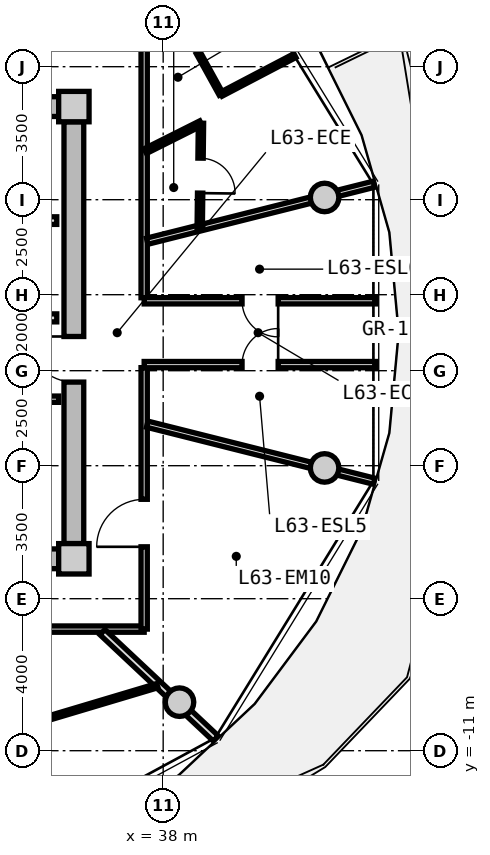
"""IFC4 building model, lengths in metres.
Left out: names, types, materials, properties, quantities, classifications, styles, units other than length and angle.
Written with IfcOpenShell. Run it as: python <this file> out.ifc"""

import sys

from ifc_helpers import new_model, si_unit, direction, frame, frame_2d, origin, origin_2d, place, context, subcontext, project, spatial, rectangle, circle, extrude, source, transform, mapped, element, fill, save


model = new_model("IFC4")
c1 = context("Model", 3, precision=1e-05, world=origin(), true_north=direction((0.0, 1.0)))
c2 = subcontext(c1, "Body", "Model", "MODEL_VIEW")
j1 = project(units=[si_unit("LENGTHUNIT", "METRE"), si_unit("PLANEANGLEUNIT", "RADIAN")], contexts=[c1])
p1 = place(None, origin())
s1 = spatial("IfcSite", under=j1, at=p1, CompositionType="ELEMENT")
p2 = place(p1, origin())
s2 = spatial("IfcBuilding", under=s1, at=p2, CompositionType="ELEMENT")
p3 = place(p2, frame((0.0, 0.0, 203.8)))
s3 = spatial("IfcBuildingStorey", under=s2, at=p3, CompositionType="ELEMENT", Elevation=203.8)
m1 = source(origin(), c2, "Body", "SweptSolid", [
    extrude(rectangle(XDim=0.8, YDim=0.8, at=origin_2d()), origin(), (0.0, 0.0, 1.0), 4.0),
])
for number, where, z_axis, x_axis in (
    (1, (35.65, -5.95, 0.0), (0.0, 0.0, 1.0), (1.0, 0.0, 0.0)),
    (2, (35.65, 5.95, 0.0), (0.0, 0.0, 1.0), (1.0, 0.0, 0.0)),
):
    element("IfcColumn", number, at=place(p3, frame(where, z_axis=z_axis, x_axis=x_axis)), inside=s3, PredefinedType="COLUMN", context=c2, shape_type="MappedRepresentation", body=[
        mapped(m1, transform((0.0, 0.0, 0.0), x_axis=(1.0, 0.0, 0.0), y_axis=(0.0, 1.0, 0.0), z_axis=(0.0, 0.0, 1.0), scale=1.0)),
    ])
m2 = source(origin(), c2, "Body", "SweptSolid", [
    extrude(rectangle(XDim=14.5, YDim=0.52, at=frame_2d((7.25, 0.0))), origin(), (0.0, 0.0, 1.0), 3.71),
])
for number, where, z_axis, x_axis in (
    (3, (20.75, 5.95, 0.0), (0.0, 0.0, 1.0), (1.0, 0.0, 0.0)),
    (4, (35.25, -5.95, 0.0), (0.0, 0.0, 1.0), (-1.0, 0.0, 0.0)),
):
    element("IfcWall", number, at=place(p3, frame(where, z_axis=z_axis, x_axis=x_axis)), inside=s3, PredefinedType="SHEAR", context=c2, shape_type="MappedRepresentation", body=[
        mapped(m2, transform((0.0, 0.0, 0.0), x_axis=(1.0, 0.0, 0.0), y_axis=(0.0, 1.0, 0.0), z_axis=(0.0, 0.0, 1.0), scale=1.0)),
    ])
m3 = source(origin(), c2, "Body", "SweptSolid", [
    extrude(rectangle(XDim=11.1, YDim=0.52, at=frame_2d((5.55, 0.0))), origin(), (0.0, 0.0, 1.0), 3.71),
])
p4 = place(p3, frame((35.65, 5.55, 0.0), z_axis=(0.0, 0.0, 1.0), x_axis=(0.0, -1.0, 0.0)))
e5 = element("IfcWall", 5, at=p4, inside=s3, PredefinedType="SHEAR", context=c2, shape_type="MappedRepresentation", body=[
    mapped(m3, transform((0.0, 0.0, 0.0), x_axis=(1.0, 0.0, 0.0), y_axis=(0.0, 1.0, 0.0), z_axis=(0.0, 0.0, 1.0), scale=1.0)),
])
p5 = place(p4, frame((5.65, 0.0, 0.0)))
e6 = element("IfcOpeningElement", 6, at=p5, cuts=e5, PredefinedType="OPENING", context=c2, shape_type="SweptSolid", body=[
    extrude(rectangle(XDim=1.2, YDim=2.15, at=frame_2d((0.6, 1.075))), frame((0.0, 0.27, 0.0), z_axis=(0.0, -1.0, 0.0), x_axis=(1.0, 0.0, 0.0)), (0.0, 0.0, 1.0), 0.54),
])
m4 = source(origin(), c2, "Body", "SweptSolid", [
    extrude(circle(Radius=0.375, at=origin_2d()), origin(), (0.0, 0.0, 1.0), 4.0),
])
for number, where, z_axis, x_axis in (
    (7, (42.247, 3.559, 0.0), (0.0, 0.0, 1.0), (1.0, 0.0, 0.0)),
    (8, (38.43, -9.723, 0.0), (0.0, 0.0, 1.0), (1.0, 0.0, 0.0)),
    (9, (42.247, -3.559, 0.0), (0.0, 0.0, 1.0), (1.0, 0.0, 0.0)),
):
    element("IfcColumn", number, at=place(p3, frame(where, z_axis=z_axis, x_axis=x_axis)), inside=s3, PredefinedType="COLUMN", context=c2, shape_type="MappedRepresentation", body=[
        mapped(m4, transform((0.0, 0.0, 0.0), x_axis=(1.0, 0.0, 0.0), y_axis=(0.0, 1.0, 0.0), z_axis=(0.0, 0.0, 1.0), scale=1.0)),
    ])
m5 = source(origin(), c2, "Body", "SweptSolid", [
    extrude(rectangle(XDim=3.2, YDim=0.2, at=frame_2d((1.6, 0.0))), origin(), (0.0, 0.0, 1.0), 3.695),
])
p6 = place(p3, frame((32.0, 2.95, 0.0), z_axis=(0.0, 0.0, 1.0), x_axis=(1.0, 0.0, 0.0)))
e10 = element("IfcWall", 10, at=p6, inside=s3, PredefinedType="PARTITIONING", context=c2, shape_type="MappedRepresentation", body=[
    mapped(m5, transform((0.0, 0.0, 0.0), x_axis=(1.0, 0.0, 0.0), y_axis=(0.0, 1.0, 0.0), z_axis=(0.0, 0.0, 1.0), scale=1.0)),
])
m6 = source(origin(), c2, "Body", "SweptSolid", [
    extrude(rectangle(XDim=6.66, YDim=0.21, at=frame_2d((3.33, 0.0))), origin(), (0.0, 0.0, 1.0), 3.695),
])
p7 = place(p3, frame((28.54, 0.39, 0.0), z_axis=(0.0, 0.0, 1.0), x_axis=(1.0, 0.0, 0.0)))
e11 = element("IfcWall", 11, at=p7, inside=s3, PredefinedType="PARTITIONING", context=c2, shape_type="MappedRepresentation", body=[
    mapped(m6, transform((0.0, 0.0, 0.0), x_axis=(1.0, 0.0, 0.0), y_axis=(0.0, 1.0, 0.0), z_axis=(0.0, 0.0, 1.0), scale=1.0)),
])
p8 = place(p7, frame((1.0, 0.0, 0.0)))
e12 = element("IfcOpeningElement", 12, at=p8, cuts=e11, PredefinedType="OPENING", context=c2, shape_type="SweptSolid", body=[
    extrude(rectangle(XDim=1.2, YDim=2.15, at=frame_2d((0.6, 1.075))), frame((0.0, 0.115, 0.0), z_axis=(0.0, -1.0, 0.0), x_axis=(1.0, 0.0, 0.0)), (0.0, 0.0, 1.0), 0.23),
])
m7 = source(origin(), c2, "Body", "SweptSolid", [
    extrude(rectangle(XDim=2.7, YDim=0.165, at=frame_2d((1.35, 0.0))), origin(), (0.0, 0.0, 1.0), 3.695),
])
p9 = place(p3, frame((32.55, -1.75, 0.0), z_axis=(0.0, 0.0, 1.0), x_axis=(1.0, 0.0, 0.0)))
e13 = element("IfcWall", 13, at=p9, inside=s3, PredefinedType="PARTITIONING", context=c2, shape_type="MappedRepresentation", body=[
    mapped(m7, transform((0.0, 0.0, 0.0), x_axis=(1.0, 0.0, 0.0), y_axis=(0.0, 1.0, 0.0), z_axis=(0.0, 0.0, 1.0), scale=1.0)),
])
p10 = place(p9, frame((0.222, 0.0, 0.0)))
e14 = element("IfcOpeningElement", 14, at=p10, cuts=e13, PredefinedType="OPENING", context=c2, shape_type="SweptSolid", body=[
    extrude(rectangle(XDim=0.925, YDim=2.1, at=frame_2d((0.462, 1.05))), frame((0.0, 0.093, 0.0), z_axis=(0.0, -1.0, 0.0), x_axis=(1.0, 0.0, 0.0)), (0.0, 0.0, 1.0), 0.185),
])
p11 = place(p9, frame((1.522, 0.0, 0.0)))
e15 = element("IfcOpeningElement", 15, at=p11, cuts=e13, PredefinedType="OPENING", context=c2, shape_type="SweptSolid", body=[
    extrude(rectangle(XDim=0.925, YDim=2.1, at=frame_2d((0.462, 1.05))), frame((0.0, 0.093, 0.0), z_axis=(0.0, -1.0, 0.0), x_axis=(1.0, 0.0, 0.0)), (0.0, 0.0, 1.0), 0.185),
])
m8 = source(origin(), c2, "Body", "SweptSolid", [
    extrude(rectangle(XDim=19.0, YDim=0.165, at=frame_2d((9.5, 0.0))), origin(), (0.0, 0.0, 1.0), 3.695),
])
p12 = place(p3, frame((37.5, -7.8, 0.0), z_axis=(0.0, 0.0, 1.0), x_axis=(-1.0, 0.0, 0.0)))
e16 = element("IfcWall", 16, at=p12, inside=s3, PredefinedType="PARTITIONING", context=c2, shape_type="MappedRepresentation", body=[
    mapped(m8, transform((0.0, 0.0, 0.0), x_axis=(1.0, 0.0, 0.0), y_axis=(0.0, 1.0, 0.0), z_axis=(0.0, 0.0, 1.0), scale=1.0)),
])
p13 = place(p12, frame((9.392, 0.0, 0.0)))
e17 = element("IfcOpeningElement", 17, at=p13, cuts=e16, PredefinedType="OPENING", context=c2, shape_type="SweptSolid", body=[
    extrude(rectangle(XDim=1.05, YDim=2.15, at=frame_2d((0.525, 1.075))), frame((0.0, 0.093, 0.0), z_axis=(0.0, -1.0, 0.0), x_axis=(1.0, 0.0, 0.0)), (0.0, 0.0, 1.0), 0.185),
])
m9 = source(origin(), c2, "Body", "SweptSolid", [
    extrude(rectangle(XDim=6.88, YDim=0.165, at=frame_2d((3.44, 0.0))), origin(), (0.0, 0.0, 1.0), 3.695),
])
p14 = place(p3, frame((37.5, 7.8, 0.0), z_axis=(0.0, 0.0, 1.0), x_axis=(0.0, -1.0, 0.0)))
e18 = element("IfcWall", 18, at=p14, inside=s3, PredefinedType="PARTITIONING", context=c2, shape_type="MappedRepresentation", body=[
    mapped(m9, transform((0.0, 0.0, 0.0), x_axis=(1.0, 0.0, 0.0), y_axis=(0.0, 1.0, 0.0), z_axis=(0.0, 0.0, 1.0), scale=1.0)),
])
p15 = place(p3, frame((37.5, -0.92, 0.0), z_axis=(0.0, 0.0, 1.0), x_axis=(0.0, -1.0, 0.0)))
e19 = element("IfcWall", 19, at=p15, inside=s3, PredefinedType="PARTITIONING", context=c2, shape_type="MappedRepresentation", body=[
    mapped(m9, transform((0.0, 0.0, 0.0), x_axis=(1.0, 0.0, 0.0), y_axis=(0.0, 1.0, 0.0), z_axis=(0.0, 0.0, 1.0), scale=1.0)),
])
p16 = place(p15, frame((3.464, 0.0, 0.0)))
e20 = element("IfcOpeningElement", 20, at=p16, cuts=e19, PredefinedType="OPENING", context=c2, shape_type="SweptSolid", body=[
    extrude(rectangle(XDim=1.25, YDim=2.2, at=frame_2d((0.625, 1.1))), frame((0.0, 0.093, 0.0), z_axis=(0.0, -1.0, 0.0), x_axis=(1.0, 0.0, 0.0)), (0.0, 0.0, 1.0), 0.185),
])
m10 = source(origin(), c2, "Body", "SweptSolid", [
    extrude(rectangle(XDim=6.157, YDim=0.165, at=frame_2d((3.079, 0.0))), origin(), (0.0, 0.0, 1.0), 3.295),
])
for number, where, z_axis, x_axis in (
    (21, (37.58, -2.407, 0.0), (0.0, 0.0, 1.0), (0.97, -0.244, 0.0)),
    (22, (37.58, 2.407, 0.0), (0.0, 0.0, 1.0), (0.97, 0.244, 0.0)),
):
    element("IfcWall", number, at=place(p3, frame(where, z_axis=z_axis, x_axis=x_axis)), inside=s3, PredefinedType="PARTITIONING", context=c2, shape_type="MappedRepresentation", body=[
        mapped(m10, transform((0.0, 0.0, 0.0), x_axis=(1.0, 0.0, 0.0), y_axis=(0.0, 1.0, 0.0), z_axis=(0.0, 0.0, 1.0), scale=1.0)),
    ])
m11 = source(origin(), c2, "Body", "SweptSolid", [
    extrude(rectangle(XDim=6.101, YDim=0.165, at=frame_2d((3.051, 0.0))), origin(), (0.0, 0.0, 1.0), 3.695),
])
p17 = place(p3, frame((37.5, 0.84, 0.0), z_axis=(0.0, 0.0, 1.0), x_axis=(1.0, 0.0, 0.0)))
e23 = element("IfcWall", 23, at=p17, inside=s3, PredefinedType="PARTITIONING", context=c2, shape_type="MappedRepresentation", body=[
    mapped(m11, transform((0.0, 0.0, 0.0), x_axis=(1.0, 0.0, 0.0), y_axis=(0.0, 1.0, 0.0), z_axis=(0.0, 0.0, 1.0), scale=1.0)),
])
p18 = place(p17, frame((2.576, 0.0, 0.0)))
e24 = element("IfcOpeningElement", 24, at=p18, cuts=e23, PredefinedType="OPENING", context=c2, shape_type="SweptSolid", body=[
    extrude(rectangle(XDim=0.95, YDim=2.1, at=frame_2d((0.475, 1.05))), frame((0.0, 0.093, 0.0), z_axis=(0.0, -1.0, 0.0), x_axis=(1.0, 0.0, 0.0)), (0.0, 0.0, 1.0), 0.185),
])
p19 = place(p3, frame((43.601, -0.84, 0.0), z_axis=(0.0, 0.0, 1.0), x_axis=(-1.0, 0.0, 0.0)))
e25 = element("IfcWall", 25, at=p19, inside=s3, PredefinedType="PARTITIONING", context=c2, shape_type="MappedRepresentation", body=[
    mapped(m11, transform((0.0, 0.0, 0.0), x_axis=(1.0, 0.0, 0.0), y_axis=(0.0, 1.0, 0.0), z_axis=(0.0, 0.0, 1.0), scale=1.0)),
])
p20 = place(p19, frame((2.576, 0.0, 0.0)))
e26 = element("IfcOpeningElement", 26, at=p20, cuts=e25, PredefinedType="OPENING", context=c2, shape_type="SweptSolid", body=[
    extrude(rectangle(XDim=0.95, YDim=2.1, at=frame_2d((0.475, 1.05))), frame((0.0, 0.093, 0.0), z_axis=(0.0, -1.0, 0.0), x_axis=(1.0, 0.0, 0.0)), (0.0, 0.0, 1.0), 0.185),
])
m12 = source(origin(), c2, "Body", "SweptSolid", [
    extrude(rectangle(XDim=1.638, YDim=0.14, at=frame_2d((0.819, 0.0))), origin(), (0.0, 0.0, 1.0), 3.695),
])
p21 = place(p3, frame((37.53, 4.778, 0.0), z_axis=(0.0, 0.0, 1.0), x_axis=(0.893919977945, 0.448226586707, 0.0)))
e27 = element("IfcWall", 27, at=p21, inside=s3, PredefinedType="PARTITIONING", context=c2, shape_type="MappedRepresentation", body=[
    mapped(m12, transform((0.0, 0.0, 0.0), x_axis=(1.0, 0.0, 0.0), y_axis=(0.0, 1.0, 0.0), z_axis=(0.0, 0.0, 1.0), scale=1.0)),
])
m13 = source(origin(), c2, "Body", "SweptSolid", [
    extrude(rectangle(XDim=2.759, YDim=0.14, at=frame_2d((1.379, 0.0))), origin(), (0.0, 0.0, 1.0), 3.695),
])
p22 = place(p3, frame((38.995, 5.513, 0.0), z_axis=(0.0, 0.0, 1.0), x_axis=(-0.01194710728, -0.999928630767, 0.0)))
e28 = element("IfcWall", 28, at=p22, inside=s3, PredefinedType="PARTITIONING", context=c2, shape_type="MappedRepresentation", body=[
    mapped(m13, transform((0.0, 0.0, 0.0), x_axis=(1.0, 0.0, 0.0), y_axis=(0.0, 1.0, 0.0), z_axis=(0.0, 0.0, 1.0), scale=1.0)),
])
p23 = place(p22, frame((0.919, 0.0, 0.0)))
e29 = element("IfcOpeningElement", 29, at=p23, cuts=e28, PredefinedType="OPENING", context=c2, shape_type="SweptSolid", body=[
    extrude(rectangle(XDim=0.92, YDim=2.1, at=frame_2d((0.46, 1.05))), frame((0.0, 0.08, 0.0), z_axis=(0.0, -1.0, 0.0), x_axis=(1.0, 0.0, 0.0)), (0.0, 0.0, 1.0), 0.16),
])
m14 = source(origin(), c2, "Body", "SweptSolid", [
    extrude(rectangle(XDim=2.193, YDim=0.115, at=frame_2d((1.097, 0.0))), origin(), (0.0, 0.0, 1.0), 3.695),
])
p24 = place(p3, frame((39.525, 6.275, 0.0), z_axis=(0.0, 0.0, 1.0), x_axis=(0.885783595046, 0.464098505435, 0.0)))
e30 = element("IfcWall", 30, at=p24, inside=s3, PredefinedType="PARTITIONING", context=c2, shape_type="MappedRepresentation", body=[
    mapped(m14, transform((0.0, 0.0, 0.0), x_axis=(1.0, 0.0, 0.0), y_axis=(0.0, 1.0, 0.0), z_axis=(0.0, 0.0, 1.0), scale=1.0)),
])
m15 = source(origin(), c2, "Body", "SweptSolid", [
    extrude(rectangle(XDim=3.45, YDim=0.115, at=frame_2d((1.725, 0.0))), origin(), (0.0, 0.0, 1.0), 3.695),
])
p25 = place(p3, frame((39.525, 6.275, 0.0), z_axis=(0.0, 0.0, 1.0), x_axis=(-0.483659007882, 0.875256513312, 0.0)))
e31 = element("IfcWall", 31, at=p25, inside=s3, PredefinedType="PARTITIONING", context=c2, shape_type="MappedRepresentation", body=[
    mapped(m15, transform((0.0, 0.0, 0.0), x_axis=(1.0, 0.0, 0.0), y_axis=(0.0, 1.0, 0.0), z_axis=(0.0, 0.0, 1.0), scale=1.0)),
])
p26 = place(p25, frame((1.25, 0.0, 0.0)))
e32 = element("IfcOpeningElement", 32, at=p26, cuts=e31, PredefinedType="OPENING", context=c2, shape_type="SweptSolid", body=[
    extrude(rectangle(XDim=0.95, YDim=2.1, at=frame_2d((0.475, 1.05))), frame((0.0, 0.067, 0.0), z_axis=(0.0, -1.0, 0.0), x_axis=(1.0, 0.0, 0.0)), (0.0, 0.0, 1.0), 0.135),
])
m16 = source(origin(), c2, "Body", "SweptSolid", [
    extrude(rectangle(XDim=4.089, YDim=0.19, at=frame_2d((2.044, 0.0))), origin(), (0.0, 0.0, 1.0), 3.295),
])
p27 = place(p3, frame((36.402, -7.88, 0.0), z_axis=(0.0, 0.0, 1.0), x_axis=(0.729401273609, -0.684086092577, 0.0)))
e33 = element("IfcWall", 33, at=p27, inside=s3, PredefinedType="PARTITIONING", context=c2, shape_type="MappedRepresentation", body=[
    mapped(m16, transform((0.0, 0.0, 0.0), x_axis=(1.0, 0.0, 0.0), y_axis=(0.0, 1.0, 0.0), z_axis=(0.0, 0.0, 1.0), scale=1.0)),
])
m17 = source(origin(), c2, "Body", "SweptSolid", [
    extrude(rectangle(XDim=6.936, YDim=0.115, at=frame_2d((3.468, 0.0))), origin(), (0.0, 0.0, 1.0), 3.695),
])
p28 = place(p3, frame((31.203, -11.272, 0.0), z_axis=(0.0, 0.0, 1.0), x_axis=(0.958186895835, 0.286143098205, 0.0)))
e34 = element("IfcWall", 34, at=p28, inside=s3, PredefinedType="PARTITIONING", context=c2, shape_type="MappedRepresentation", body=[
    mapped(m17, transform((0.0, 0.0, 0.0), x_axis=(1.0, 0.0, 0.0), y_axis=(0.0, 1.0, 0.0), z_axis=(0.0, 0.0, 1.0), scale=1.0)),
])
p29 = place(p28, frame((2.993, 0.0, 0.0)))
e35 = element("IfcOpeningElement", 35, at=p29, cuts=e34, PredefinedType="OPENING", context=c2, shape_type="SweptSolid", body=[
    extrude(rectangle(XDim=0.95, YDim=2.1, at=frame_2d((0.475, 1.05))), frame((0.0, 0.067, 0.0), z_axis=(0.0, -1.0, 0.0), x_axis=(1.0, 0.0, 0.0)), (0.0, 0.0, 1.0), 0.135),
])
m18 = source(origin(), c2, "Body", "SweptSolid", [
    extrude(rectangle(XDim=1.2, YDim=2.15, at=frame_2d((0.6, 1.075))), frame((0.0, 0.025, 0.0), z_axis=(0.0, -1.0, 0.0), x_axis=(1.0, 0.0, 0.0)), (0.0, 0.0, 1.0), 0.05),
])
p30 = place(p5, frame((1.2, 0.0, 0.0), z_axis=(0.0, 0.0, 1.0), x_axis=(-1.0, 0.0, 0.0)))
e36 = element("IfcDoor", 36, at=p30, inside=s3, OperationType="SINGLE_SWING_RIGHT", PredefinedType="DOOR", context=c2, shape_type="MappedRepresentation", body=[
    mapped(m18, transform((0.0, 0.0, 0.0), x_axis=(1.0, 0.0, 0.0), y_axis=(0.0, 1.0, 0.0), z_axis=(0.0, 0.0, 1.0), scale=1.0)),
])
fill(e6, e36)
m19 = source(origin(), c2, "Body", "SweptSolid", [
    extrude(rectangle(XDim=0.95, YDim=2.1, at=frame_2d((0.475, 1.05))), frame((0.0, 0.025, 0.0), z_axis=(0.0, -1.0, 0.0), x_axis=(1.0, 0.0, 0.0)), (0.0, 0.0, 1.0), 0.05),
])
p31 = place(p20, frame((0.95, 0.0, 0.0), z_axis=(0.0, 0.0, 1.0), x_axis=(-1.0, 0.0, 0.0)))
e37 = element("IfcDoor", 37, at=p31, inside=s3, OperationType="SINGLE_SWING_RIGHT", PredefinedType="DOOR", context=c2, shape_type="MappedRepresentation", body=[
    mapped(m19, transform((0.0, 0.0, 0.0), x_axis=(1.0, 0.0, 0.0), y_axis=(0.0, 1.0, 0.0), z_axis=(0.0, 0.0, 1.0), scale=1.0)),
])
fill(e26, e37)
p32 = place(p18, frame((0.95, 0.0, 0.0), z_axis=(0.0, 0.0, 1.0), x_axis=(-1.0, 0.0, 0.0)))
e38 = element("IfcDoor", 38, at=p32, inside=s3, OperationType="SINGLE_SWING_LEFT", PredefinedType="DOOR", context=c2, shape_type="MappedRepresentation", body=[
    mapped(m19, transform((0.0, 0.0, 0.0), x_axis=(1.0, 0.0, 0.0), y_axis=(0.0, 1.0, 0.0), z_axis=(0.0, 0.0, 1.0), scale=1.0)),
])
fill(e24, e38)
m20 = source(origin(), c2, "Body", "SweptSolid", [
    extrude(rectangle(XDim=0.92, YDim=2.1, at=frame_2d((0.46, 1.05))), frame((0.0, 0.025, 0.0), z_axis=(0.0, -1.0, 0.0), x_axis=(1.0, 0.0, 0.0)), (0.0, 0.0, 1.0), 0.05),
])
p33 = place(p23, origin())
e39 = element("IfcDoor", 39, at=p33, inside=s3, OperationType="SINGLE_SWING_RIGHT", PredefinedType="DOOR", context=c2, shape_type="MappedRepresentation", body=[
    mapped(m20, transform((0.0, 0.0, 0.0), x_axis=(1.0, 0.0, 0.0), y_axis=(0.0, 1.0, 0.0), z_axis=(0.0, 0.0, 1.0), scale=1.0)),
])
fill(e29, e39)
p34 = place(p26, frame((0.95, 0.0, 0.0), z_axis=(0.0, 0.0, 1.0), x_axis=(-1.0, 0.0, 0.0)))
e40 = element("IfcDoor", 40, at=p34, inside=s3, OperationType="SINGLE_SWING_LEFT", PredefinedType="DOOR", context=c2, shape_type="MappedRepresentation", body=[
    mapped(m19, transform((0.0, 0.0, 0.0), x_axis=(1.0, 0.0, 0.0), y_axis=(0.0, 1.0, 0.0), z_axis=(0.0, 0.0, 1.0), scale=1.0)),
])
fill(e32, e40)
m21 = source(origin(), c2, "Body", "SweptSolid", [
    extrude(rectangle(XDim=1.25, YDim=2.2, at=frame_2d((0.625, 1.1))), frame((0.0, 0.025, 0.0), z_axis=(0.0, -1.0, 0.0), x_axis=(1.0, 0.0, 0.0)), (0.0, 0.0, 1.0), 0.05),
])
p35 = place(p16, frame((1.25, 0.0, 0.0), z_axis=(0.0, 0.0, 1.0), x_axis=(-1.0, 0.0, 0.0)))
e41 = element("IfcDoor", 41, at=p35, inside=s3, OperationType="SINGLE_SWING_LEFT", PredefinedType="DOOR", context=c2, shape_type="MappedRepresentation", body=[
    mapped(m21, transform((0.0, 0.0, 0.0), x_axis=(1.0, 0.0, 0.0), y_axis=(0.0, 1.0, 0.0), z_axis=(0.0, 0.0, 1.0), scale=1.0)),
])
fill(e20, e41)
save(model, sys.argv[1])
